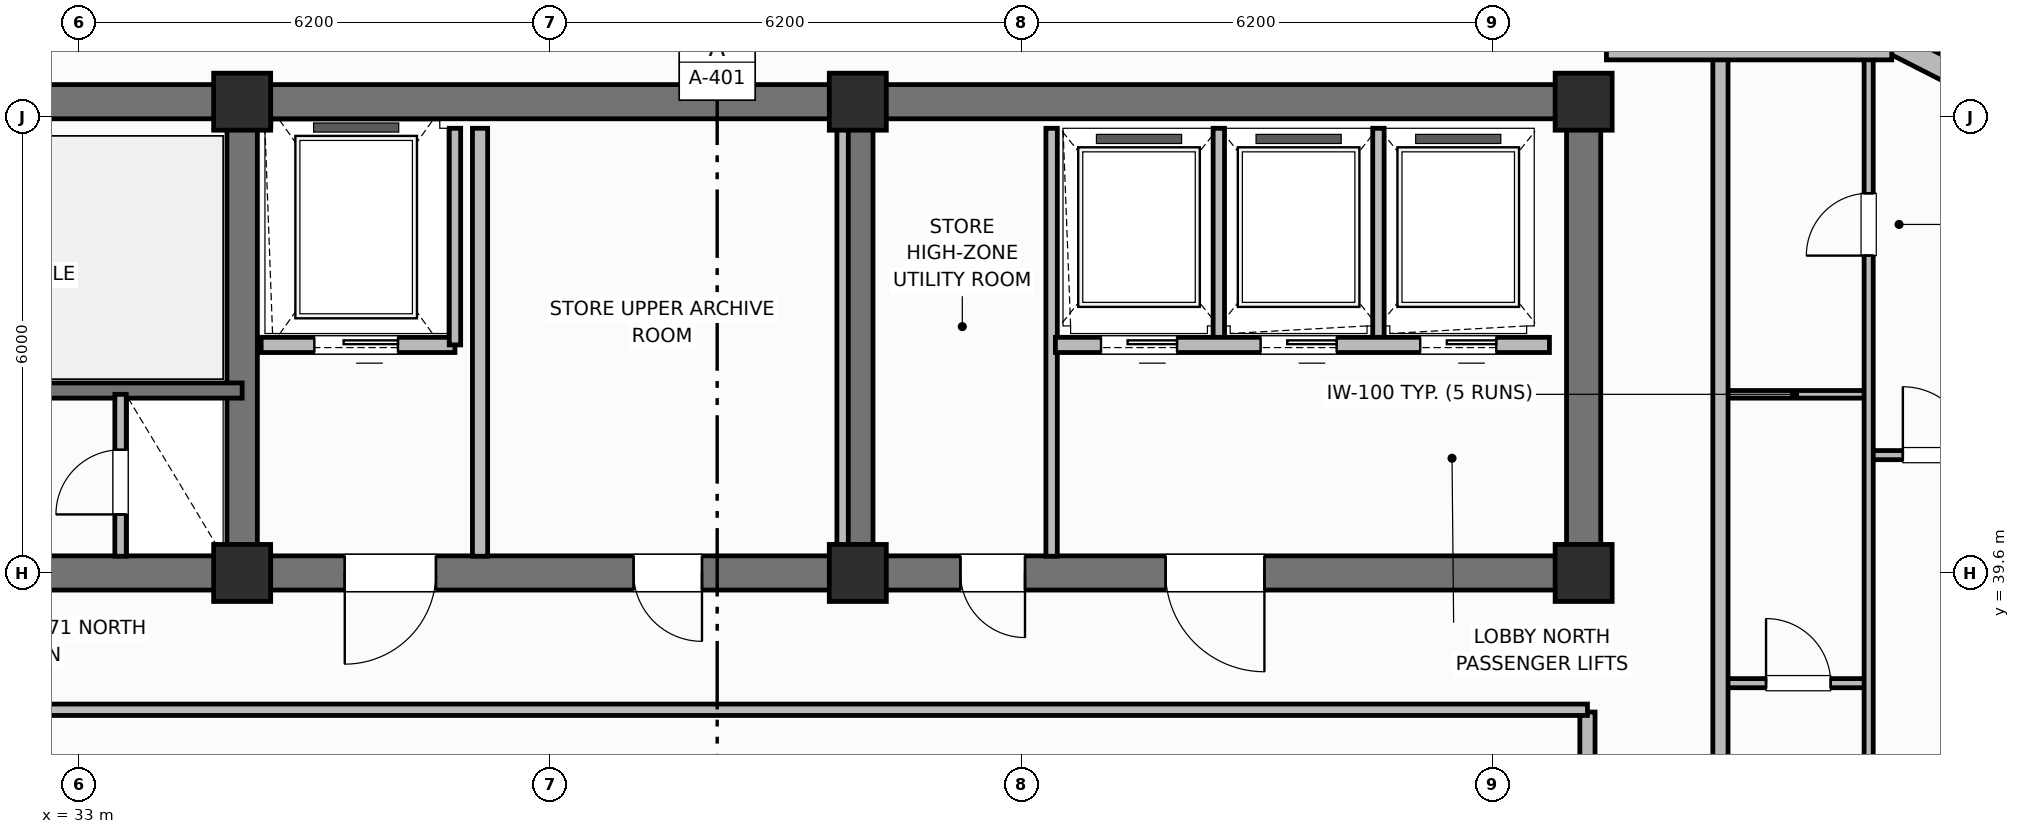
"""IFC4 building model, lengths in metres.
Left out: names, types, materials, properties, quantities, classifications, styles, units other than length and angle.
Written with IfcOpenShell. Run it as: python <this file> out.ifc"""

import sys

from ifc_helpers import new_model, si_unit, direction, frame, frame_2d, origin, origin_2d, place, context, subcontext, project, spatial, rectangle, extrude, element, fill, save


model = new_model("IFC4")
c1 = context("Model", 3, precision=1e-05, world=origin(), true_north=direction((0.0, 1.0)))
c2 = subcontext(c1, "Body", "Model", "MODEL_VIEW")
j1 = project(units=[si_unit("LENGTHUNIT", "METRE"), si_unit("PLANEANGLEUNIT", "RADIAN")], contexts=[c1])
p1 = place(None, origin())
s1 = spatial("IfcSite", under=j1, at=p1, CompositionType="ELEMENT")
p2 = place(p1, origin())
s2 = spatial("IfcBuilding", under=s1, at=p2, CompositionType="ELEMENT")
p3 = place(p2, frame((0.0, 0.0, 282.4)))
s3 = spatial("IfcBuildingStorey", under=s2, at=p3, CompositionType="ELEMENT", Elevation=282.4)
p4 = place(p3, frame((25.6, 45.8, 0.0), z_axis=(0.0, 0.0, 1.0), x_axis=(1.0, 0.0, 0.0)))
e1 = element("IfcWall", 1, at=p4, inside=s3, PredefinedType="SHEAR", context=c2, shape_type="SweptSolid", body=[
    extrude(rectangle(XDim=27.2, YDim=0.45, at=frame_2d((13.6, 0.0))), origin(), (0.0, 0.0, 1.0), 3.7),
])
p5 = place(p3, frame((52.8, 39.825, 0.0), z_axis=(0.0, 0.0, 1.0), x_axis=(0.0, 1.0, 0.0)))
e2 = element("IfcWall", 2, at=p5, inside=s3, PredefinedType="SHEAR", context=c2, shape_type="SweptSolid", body=[
    extrude(rectangle(XDim=5.75, YDim=0.45, at=frame_2d((2.875, 0.0))), origin(), (0.0, 0.0, 1.0), 3.7),
])
p6 = place(p3, frame((52.8, 39.6, 0.0), z_axis=(0.0, 0.0, 1.0), x_axis=(-1.0, 0.0, 0.0)))
e3 = element("IfcWall", 3, at=p6, inside=s3, PredefinedType="SHEAR", context=c2, shape_type="SweptSolid", body=[
    extrude(rectangle(XDim=27.2, YDim=0.45, at=frame_2d((13.6, 0.0))), origin(), (0.0, 0.0, 1.0), 3.7),
])
p7 = place(p6, frame((24.2, 0.0, 0.0)))
e4 = element("IfcOpeningElement", 4, at=p7, cuts=e3, PredefinedType="OPENING", context=c2, shape_type="SweptSolid", body=[
    extrude(rectangle(XDim=1.1, YDim=2.15, at=frame_2d((0.55, 1.075))), frame((0.0, 0.235, 0.0), z_axis=(0.0, -1.0, 0.0), x_axis=(1.0, 0.0, 0.0)), (0.0, 0.0, 1.0), 0.47),
])
p8 = place(p6, frame((15.1, 0.0, 0.0)))
e5 = element("IfcOpeningElement", 5, at=p8, cuts=e3, PredefinedType="OPENING", context=c2, shape_type="SweptSolid", body=[
    extrude(rectangle(XDim=1.2, YDim=2.15, at=frame_2d((0.6, 1.075))), frame((0.0, 0.235, 0.0), z_axis=(0.0, -1.0, 0.0), x_axis=(1.0, 0.0, 0.0)), (0.0, 0.0, 1.0), 0.47),
])
p9 = place(p6, frame((11.6, 0.0, 0.0)))
e6 = element("IfcOpeningElement", 6, at=p9, cuts=e3, PredefinedType="OPENING", context=c2, shape_type="SweptSolid", body=[
    extrude(rectangle(XDim=0.9, YDim=2.1, at=frame_2d((0.45, 1.05))), frame((0.0, 0.235, 0.0), z_axis=(0.0, -1.0, 0.0), x_axis=(1.0, 0.0, 0.0)), (0.0, 0.0, 1.0), 0.47),
])
p10 = place(p6, frame((7.35, 0.0, 0.0)))
e7 = element("IfcOpeningElement", 7, at=p10, cuts=e3, PredefinedType="OPENING", context=c2, shape_type="SweptSolid", body=[
    extrude(rectangle(XDim=0.85, YDim=2.1, at=frame_2d((0.425, 1.05))), frame((0.0, 0.235, 0.0), z_axis=(0.0, -1.0, 0.0), x_axis=(1.0, 0.0, 0.0)), (0.0, 0.0, 1.0), 0.47),
])
p11 = place(p6, frame((4.2, 0.0, 0.0)))
e8 = element("IfcOpeningElement", 8, at=p11, cuts=e3, PredefinedType="OPENING", context=c2, shape_type="SweptSolid", body=[
    extrude(rectangle(XDim=1.3, YDim=2.2, at=frame_2d((0.65, 1.1))), frame((0.0, 0.235, 0.0), z_axis=(0.0, -1.0, 0.0), x_axis=(1.0, 0.0, 0.0)), (0.0, 0.0, 1.0), 0.47),
])
for number, where, z_axis, x_axis in (
    (9, (35.15, 39.825, 0.0), (0.0, 0.0, 1.0), (0.0, 1.0, 0.0)),
    (10, (43.25, 39.825, 0.0), (0.0, 0.0, 1.0), (0.0, 1.0, 0.0)),
):
    element("IfcWall", number, at=place(p3, frame(where, z_axis=z_axis, x_axis=x_axis)), inside=s3, PredefinedType="SHEAR", context=c2, shape_type="SweptSolid", body=[
        extrude(rectangle(XDim=5.75, YDim=0.4, at=frame_2d((2.875, 0.0))), origin(), (0.0, 0.0, 1.0), 3.7),
    ])
for number, where, z_axis, x_axis in (
    (11, (35.15, 39.6, 0.0), (0.0, 0.0, 1.0), (1.0, 0.0, 0.0)),
    (12, (35.15, 45.8, 0.0), (0.0, 0.0, 1.0), (1.0, 0.0, 0.0)),
    (13, (43.25, 39.6, 0.0), (0.0, 0.0, 1.0), (1.0, 0.0, 0.0)),
    (14, (43.25, 45.8, 0.0), (0.0, 0.0, 1.0), (1.0, 0.0, 0.0)),
    (15, (52.8, 39.6, 0.0), (0.0, 0.0, 1.0), (1.0, 0.0, 0.0)),
    (16, (52.8, 45.8, 0.0), (0.0, 0.0, 1.0), (1.0, 0.0, 0.0)),
):
    element("IfcColumn", number, at=place(p3, frame(where, z_axis=z_axis, x_axis=x_axis)), inside=s3, PredefinedType="COLUMN", context=c2, shape_type="SweptSolid", body=[
        extrude(rectangle(XDim=0.75, YDim=0.75, at=origin_2d()), origin(), (0.0, 0.0, 1.0), 3.7),
    ])
p12 = place(p3, frame((57.633, 46.188, 0.0), z_axis=(0.0, 0.0, 1.0), x_axis=(-0.891076589373, 0.453852962833, 0.0)))
e17 = element("IfcWall", 17, at=p12, inside=s3, PredefinedType="SOLIDWALL", context=c2, shape_type="SweptSolid", body=[
    extrude(rectangle(XDim=0.954, YDim=0.3, at=frame_2d((0.477, 0.0))), origin(), (0.0, 0.0, 1.0), 2.73),
])
p13 = place(p3, frame((35.15, 42.0, 0.0), z_axis=(0.0, 0.0, 1.0), x_axis=(-1.0, 0.0, 0.0)))
e18 = element("IfcWall", 18, at=p13, inside=s3, PredefinedType="SHEAR", context=c2, shape_type="SweptSolid", body=[
    extrude(rectangle(XDim=9.55, YDim=0.2, at=frame_2d((4.775, 0.0))), origin(), (0.0, 0.0, 1.0), 3.7),
])
p14 = place(p13, frame((7.25, 0.0, 0.0)))
e19 = element("IfcOpeningElement", 19, at=p14, cuts=e18, PredefinedType="OPENING", context=c2, shape_type="SweptSolid", body=[
    extrude(rectangle(XDim=1.1, YDim=2.15, at=frame_2d((0.55, 1.075))), frame((0.0, 0.11, 0.0), z_axis=(0.0, -1.0, 0.0), x_axis=(1.0, 0.0, 0.0)), (0.0, 0.0, 1.0), 0.22),
])
p15 = place(p3, frame((33.55, 39.82, 0.0), z_axis=(0.0, 0.0, 1.0), x_axis=(0.0, 1.0, 0.0)))
e20 = element("IfcWall", 20, at=p15, inside=s3, PredefinedType="PARTITIONING", context=c2, shape_type="SweptSolid", body=[
    extrude(rectangle(XDim=2.13, YDim=0.15, at=frame_2d((1.065, 0.0))), origin(), (0.0, 0.0, 1.0), 2.56),
])
p16 = place(p15, frame((0.55, 0.0, 0.0)))
e21 = element("IfcOpeningElement", 21, at=p16, cuts=e20, PredefinedType="OPENING", context=c2, shape_type="SweptSolid", body=[
    extrude(rectangle(XDim=0.85, YDim=2.05, at=frame_2d((0.425, 1.025))), frame((0.0, 0.085, 0.0), z_axis=(0.0, -1.0, 0.0), x_axis=(1.0, 0.0, 0.0)), (0.0, 0.0, 1.0), 0.17),
])
p17 = place(p3, frame((37.95, 42.6, 0.0), z_axis=(0.0, 0.0, 1.0), x_axis=(-1.0, 0.0, 0.0)))
e22 = element("IfcWall", 22, at=p17, inside=s3, PredefinedType="PARTITIONING", context=c2, shape_type="SweptSolid", body=[
    extrude(rectangle(XDim=2.55, YDim=0.2, at=frame_2d((1.275, 0.0))), origin(), (0.0, 0.0, 1.0), 2.33),
])
p18 = place(p17, frame((0.75, 0.0, 0.0)))
e23 = element("IfcOpeningElement", 23, at=p18, cuts=e22, PredefinedType="OPENING", context=c2, shape_type="SweptSolid", body=[
    extrude(rectangle(XDim=1.1, YDim=2.15, at=frame_2d((0.55, 1.075))), frame((0.0, 0.11, 0.0), z_axis=(0.0, -1.0, 0.0), x_axis=(1.0, 0.0, 0.0)), (0.0, 0.0, 1.0), 0.22),
])
p19 = place(p3, frame((37.95, 42.6, 0.0), z_axis=(0.0, 0.0, 1.0), x_axis=(0.0, 1.0, 0.0)))
e24 = element("IfcWall", 24, at=p19, inside=s3, PredefinedType="PARTITIONING", context=c2, shape_type="SweptSolid", body=[
    extrude(rectangle(XDim=2.85, YDim=0.15, at=frame_2d((1.425, 0.0))), origin(), (0.0, 0.0, 1.0), 2.56),
])
p20 = place(p3, frame((38.28, 39.82, 0.0), z_axis=(0.0, 0.0, 1.0), x_axis=(0.0, 1.0, 0.0)))
e25 = element("IfcWall", 25, at=p20, inside=s3, PredefinedType="PARTITIONING", context=c2, shape_type="SweptSolid", body=[
    extrude(rectangle(XDim=5.63, YDim=0.2, at=frame_2d((2.815, 0.0))), origin(), (0.0, 0.0, 1.0), 2.56),
])
for number, where, z_axis, x_axis in (
    (26, (43.05, 39.82, 0.0), (0.0, 0.0, 1.0), (0.0, 1.0, 0.0)),
    (27, (45.8, 39.82, 0.0), (0.0, 0.0, 1.0), (0.0, 1.0, 0.0)),
):
    element("IfcWall", number, at=place(p3, frame(where, z_axis=z_axis, x_axis=x_axis)), inside=s3, PredefinedType="PARTITIONING", context=c2, shape_type="SweptSolid", body=[
        extrude(rectangle(XDim=5.63, YDim=0.15, at=frame_2d((2.815, 0.0))), origin(), (0.0, 0.0, 1.0), 2.56),
    ])
for number, where, z_axis, x_axis in (
    (28, (48.0, 42.65, 0.0), (0.0, 0.0, 1.0), (0.0, 1.0, 0.0)),
    (29, (50.1, 42.65, 0.0), (0.0, 0.0, 1.0), (0.0, 1.0, 0.0)),
):
    element("IfcWall", number, at=place(p3, frame(where, z_axis=z_axis, x_axis=x_axis)), inside=s3, PredefinedType="PARTITIONING", context=c2, shape_type="SweptSolid", body=[
        extrude(rectangle(XDim=2.8, YDim=0.15, at=frame_2d((1.4, 0.0))), origin(), (0.0, 0.0, 1.0), 2.56),
    ])
p21 = place(p3, frame((52.35, 42.6, 0.0), z_axis=(0.0, 0.0, 1.0), x_axis=(-1.0, 0.0, 0.0)))
e30 = element("IfcWall", 30, at=p21, inside=s3, PredefinedType="PARTITIONING", context=c2, shape_type="SweptSolid", body=[
    extrude(rectangle(XDim=6.5, YDim=0.2, at=frame_2d((3.25, 0.0))), origin(), (0.0, 0.0, 1.0), 2.56),
])
p22 = place(p21, frame((4.9, 0.0, 0.0)))
e31 = element("IfcOpeningElement", 31, at=p22, cuts=e30, PredefinedType="OPENING", context=c2, shape_type="SweptSolid", body=[
    extrude(rectangle(XDim=1.0, YDim=2.15, at=frame_2d((0.5, 1.075))), frame((0.0, 0.11, 0.0), z_axis=(0.0, -1.0, 0.0), x_axis=(1.0, 0.0, 0.0)), (0.0, 0.0, 1.0), 0.22),
])
p23 = place(p21, frame((2.8, 0.0, 0.0)))
e32 = element("IfcOpeningElement", 32, at=p23, cuts=e30, PredefinedType="OPENING", context=c2, shape_type="SweptSolid", body=[
    extrude(rectangle(XDim=1.0, YDim=2.15, at=frame_2d((0.5, 1.075))), frame((0.0, 0.11, 0.0), z_axis=(0.0, -1.0, 0.0), x_axis=(1.0, 0.0, 0.0)), (0.0, 0.0, 1.0), 0.22),
])
p24 = place(p21, frame((0.7, 0.0, 0.0)))
e33 = element("IfcOpeningElement", 33, at=p24, cuts=e30, PredefinedType="OPENING", context=c2, shape_type="SweptSolid", body=[
    extrude(rectangle(XDim=1.0, YDim=2.15, at=frame_2d((0.5, 1.075))), frame((0.0, 0.11, 0.0), z_axis=(0.0, -1.0, 0.0), x_axis=(1.0, 0.0, 0.0)), (0.0, 0.0, 1.0), 0.22),
])
p25 = place(p3, frame((52.85, 18.63, 0.0), z_axis=(0.0, 0.0, 1.0), x_axis=(0.0, 1.0, 0.0)))
e34 = element("IfcWall", 34, at=p25, inside=s3, PredefinedType="PARTITIONING", context=c2, shape_type="SweptSolid", body=[
    extrude(rectangle(XDim=19.14, YDim=0.2, at=frame_2d((9.57, 0.0))), origin(), (0.0, 0.0, 1.0), 2.56),
])
p26 = place(p3, frame((29.9, 37.8, 0.0), z_axis=(0.0, 0.0, 1.0), x_axis=(1.0, 0.0, 0.0)))
e35 = element("IfcWall", 35, at=p26, inside=s3, PredefinedType="PARTITIONING", context=c2, shape_type="SweptSolid", body=[
    extrude(rectangle(XDim=22.95, YDim=0.15, at=frame_2d((11.475, 0.0))), origin(), (0.0, 0.0, 1.0), 2.56),
])
p27 = place(p3, frame((54.6, 38.15, 0.0), z_axis=(0.0, 0.0, 1.0), x_axis=(1.0, 0.0, 0.0)))
e36 = element("IfcWall", 36, at=p27, inside=s3, PredefinedType="PARTITIONING", context=c2, shape_type="SweptSolid", body=[
    extrude(rectangle(XDim=1.95, YDim=0.12, at=frame_2d((0.975, 0.0))), origin(), (0.0, 0.0, 1.0), 2.56),
])
p28 = place(p27, frame((0.6, 0.0, 0.0)))
e37 = element("IfcOpeningElement", 37, at=p28, cuts=e36, PredefinedType="OPENING", context=c2, shape_type="SweptSolid", body=[
    extrude(rectangle(XDim=0.85, YDim=2.1, at=frame_2d((0.425, 1.05))), frame((0.0, 0.07, 0.0), z_axis=(0.0, -1.0, 0.0), x_axis=(1.0, 0.0, 0.0)), (0.0, 0.0, 1.0), 0.14),
])
p29 = place(p3, frame((54.6, 41.95, 0.0), z_axis=(0.0, 0.0, 1.0), x_axis=(1.0, 0.0, 0.0)))
e38 = element("IfcWall", 38, at=p29, inside=s3, PredefinedType="PARTITIONING", context=c2, shape_type="SweptSolid", body=[
    extrude(rectangle(XDim=1.95, YDim=0.1, at=frame_2d((0.975, 0.0))), origin(), (0.0, 0.0, 1.0), 2.56),
])
p30 = place(p3, frame((56.55, 41.15, 0.0), z_axis=(0.0, 0.0, 1.0), x_axis=(1.0, 0.0, 0.0)))
e39 = element("IfcWall", 39, at=p30, inside=s3, PredefinedType="PARTITIONING", context=c2, shape_type="SweptSolid", body=[
    extrude(rectangle(XDim=2.32, YDim=0.12, at=frame_2d((1.16, 0.0))), origin(), (0.0, 0.0, 1.0), 2.56),
])
p31 = place(p30, frame((0.45, 0.0, 0.0)))
e40 = element("IfcOpeningElement", 40, at=p31, cuts=e39, PredefinedType="OPENING", context=c2, shape_type="SweptSolid", body=[
    extrude(rectangle(XDim=0.9, YDim=2.1, at=frame_2d((0.45, 1.05))), frame((0.0, 0.07, 0.0), z_axis=(0.0, -1.0, 0.0), x_axis=(1.0, 0.0, 0.0)), (0.0, 0.0, 1.0), 0.14),
])
p32 = place(p3, frame((56.55, 32.79, 0.0), z_axis=(0.0, 0.0, 1.0), x_axis=(0.0, 1.0, 0.0)))
e41 = element("IfcWall", 41, at=p32, inside=s3, PredefinedType="PARTITIONING", context=c2, shape_type="SweptSolid", body=[
    extrude(rectangle(XDim=13.62, YDim=0.12, at=frame_2d((6.81, 0.0))), origin(), (0.0, 0.0, 1.0), 2.56),
])
p33 = place(p32, frame((0.61, 0.0, 0.0)))
e42 = element("IfcOpeningElement", 42, at=p33, cuts=e41, PredefinedType="OPENING", context=c2, shape_type="SweptSolid", body=[
    extrude(rectangle(XDim=0.9, YDim=2.1, at=frame_2d((0.45, 1.05))), frame((0.0, 0.07, 0.0), z_axis=(0.0, -1.0, 0.0), x_axis=(1.0, 0.0, 0.0)), (0.0, 0.0, 1.0), 0.14),
])
p34 = place(p32, frame((10.985, 0.0, 0.0)))
e43 = element("IfcOpeningElement", 43, at=p34, cuts=e41, PredefinedType="OPENING", context=c2, shape_type="SweptSolid", body=[
    extrude(rectangle(XDim=0.82, YDim=2.08, at=frame_2d((0.41, 1.04))), frame((0.0, 0.07, 0.0), z_axis=(0.0, -1.0, 0.0), x_axis=(1.0, 0.0, 0.0)), (0.0, 0.0, 1.0), 0.14),
])
p35 = place(p3, frame((54.6, 9.95, 0.0), z_axis=(0.0, 0.0, 1.0), x_axis=(0.0, 1.0, 0.0)))
e44 = element("IfcWall", 44, at=p35, inside=s3, PredefinedType="PARTITIONING", context=c2, shape_type="SweptSolid", body=[
    extrude(rectangle(XDim=36.5, YDim=0.2, at=frame_2d((18.25, 0.0))), origin(), (0.0, 0.0, 1.0), 2.56),
])
p36 = place(p35, frame((3.25, 0.0, 0.0)))
e45 = element("IfcOpeningElement", 45, at=p36, cuts=e44, PredefinedType="OPENING", context=c2, shape_type="SweptSolid", body=[
    extrude(rectangle(XDim=1.0, YDim=2.15, at=frame_2d((0.5, 1.075))), frame((0.0, 0.11, 0.0), z_axis=(0.0, -1.0, 0.0), x_axis=(1.0, 0.0, 0.0)), (0.0, 0.0, 1.0), 0.22),
])
p37 = place(p35, frame((23.5, 0.0, 0.0)))
e46 = element("IfcOpeningElement", 46, at=p37, cuts=e44, PredefinedType="OPENING", context=c2, shape_type="SweptSolid", body=[
    extrude(rectangle(XDim=1.0, YDim=2.15, at=frame_2d((0.5, 1.075))), frame((0.0, 0.11, 0.0), z_axis=(0.0, -1.0, 0.0), x_axis=(1.0, 0.0, 0.0)), (0.0, 0.0, 1.0), 0.22),
])
p38 = place(p3, frame((53.1, 46.45, 0.0), z_axis=(0.0, 0.0, 1.0), x_axis=(1.0, 0.0, 0.0)))
e47 = element("IfcWall", 47, at=p38, inside=s3, PredefinedType="PARTITIONING", context=c2, shape_type="SweptSolid", body=[
    extrude(rectangle(XDim=3.754, YDim=0.2, at=frame_2d((1.877, 0.0))), origin(), (0.0, 0.0, 1.0), 2.56),
])
p39 = place(p16, origin())
e48 = element("IfcDoor", 48, at=p39, inside=s3, OperationType="SINGLE_SWING_LEFT", PredefinedType="TRAPDOOR", context=c2, shape_type="SweptSolid", body=[
    extrude(rectangle(XDim=0.85, YDim=2.05, at=frame_2d((0.425, 1.025))), frame((0.0, 0.025, 0.0), z_axis=(0.0, -1.0, 0.0), x_axis=(1.0, 0.0, 0.0)), (0.0, 0.0, 1.0), 0.05),
])
fill(e21, e48)
p40 = place(p18, origin())
e49 = element("IfcDoor", 49, at=p40, inside=s3, OperationType="SLIDING_TO_LEFT", PredefinedType="DOOR", context=c2, shape_type="SweptSolid", body=[
    extrude(rectangle(XDim=1.1, YDim=2.15, at=frame_2d((0.55, 1.075))), frame((0.0, 0.025, 0.0), z_axis=(0.0, -1.0, 0.0), x_axis=(1.0, 0.0, 0.0)), (0.0, 0.0, 1.0), 0.05),
])
fill(e23, e49)
p41 = place(p22, origin())
e50 = element("IfcDoor", 50, at=p41, inside=s3, OperationType="SLIDING_TO_LEFT", PredefinedType="DOOR", context=c2, shape_type="SweptSolid", body=[
    extrude(rectangle(XDim=1.0, YDim=2.15, at=frame_2d((0.5, 1.075))), frame((0.0, 0.025, 0.0), z_axis=(0.0, -1.0, 0.0), x_axis=(1.0, 0.0, 0.0)), (0.0, 0.0, 1.0), 0.05),
])
fill(e31, e50)
p42 = place(p23, origin())
e51 = element("IfcDoor", 51, at=p42, inside=s3, OperationType="SLIDING_TO_LEFT", PredefinedType="DOOR", context=c2, shape_type="SweptSolid", body=[
    extrude(rectangle(XDim=1.0, YDim=2.15, at=frame_2d((0.5, 1.075))), frame((0.0, 0.025, 0.0), z_axis=(0.0, -1.0, 0.0), x_axis=(1.0, 0.0, 0.0)), (0.0, 0.0, 1.0), 0.05),
])
fill(e32, e51)
p43 = place(p24, origin())
e52 = element("IfcDoor", 52, at=p43, inside=s3, OperationType="SLIDING_TO_LEFT", PredefinedType="DOOR", context=c2, shape_type="SweptSolid", body=[
    extrude(rectangle(XDim=1.0, YDim=2.15, at=frame_2d((0.5, 1.075))), frame((0.0, 0.025, 0.0), z_axis=(0.0, -1.0, 0.0), x_axis=(1.0, 0.0, 0.0)), (0.0, 0.0, 1.0), 0.05),
])
fill(e33, e52)
p44 = place(p28, origin())
e53 = element("IfcDoor", 53, at=p44, inside=s3, OperationType="SINGLE_SWING_LEFT", PredefinedType="DOOR", context=c2, shape_type="SweptSolid", body=[
    extrude(rectangle(XDim=0.85, YDim=2.1, at=frame_2d((0.425, 1.05))), frame((0.0, 0.025, 0.0), z_axis=(0.0, -1.0, 0.0), x_axis=(1.0, 0.0, 0.0)), (0.0, 0.0, 1.0), 0.05),
])
fill(e37, e53)
p45 = place(p31, origin())
e54 = element("IfcDoor", 54, at=p45, inside=s3, OperationType="SINGLE_SWING_LEFT", PredefinedType="DOOR", context=c2, shape_type="SweptSolid", body=[
    extrude(rectangle(XDim=0.9, YDim=2.1, at=frame_2d((0.45, 1.05))), frame((0.0, 0.025, 0.0), z_axis=(0.0, -1.0, 0.0), x_axis=(1.0, 0.0, 0.0)), (0.0, 0.0, 1.0), 0.05),
])
fill(e40, e54)
p46 = place(p34, origin())
e55 = element("IfcDoor", 55, at=p46, inside=s3, OperationType="SINGLE_SWING_LEFT", PredefinedType="DOOR", context=c2, shape_type="SweptSolid", body=[
    extrude(rectangle(XDim=0.82, YDim=2.08, at=frame_2d((0.41, 1.04))), frame((0.0, 0.025, 0.0), z_axis=(0.0, -1.0, 0.0), x_axis=(1.0, 0.0, 0.0)), (0.0, 0.0, 1.0), 0.05),
])
fill(e43, e55)
p47 = place(p8, origin())
e56 = element("IfcDoor", 56, at=p47, inside=s3, OperationType="SINGLE_SWING_RIGHT", PredefinedType="DOOR", context=c2, shape_type="SweptSolid", body=[
    extrude(rectangle(XDim=1.2, YDim=2.15, at=frame_2d((0.6, 1.075))), frame((0.0, 0.025, 0.0), z_axis=(0.0, -1.0, 0.0), x_axis=(1.0, 0.0, 0.0)), (0.0, 0.0, 1.0), 0.05),
])
fill(e5, e56)
p48 = place(p9, origin())
e57 = element("IfcDoor", 57, at=p48, inside=s3, OperationType="SINGLE_SWING_LEFT", PredefinedType="DOOR", context=c2, shape_type="SweptSolid", body=[
    extrude(rectangle(XDim=0.9, YDim=2.1, at=frame_2d((0.45, 1.05))), frame((0.0, 0.025, 0.0), z_axis=(0.0, -1.0, 0.0), x_axis=(1.0, 0.0, 0.0)), (0.0, 0.0, 1.0), 0.05),
])
fill(e6, e57)
p49 = place(p10, origin())
e58 = element("IfcDoor", 58, at=p49, inside=s3, OperationType="SINGLE_SWING_LEFT", PredefinedType="DOOR", context=c2, shape_type="SweptSolid", body=[
    extrude(rectangle(XDim=0.85, YDim=2.1, at=frame_2d((0.425, 1.05))), frame((0.0, 0.025, 0.0), z_axis=(0.0, -1.0, 0.0), x_axis=(1.0, 0.0, 0.0)), (0.0, 0.0, 1.0), 0.05),
])
fill(e7, e58)
p50 = place(p11, origin())
e59 = element("IfcDoor", 59, at=p50, inside=s3, OperationType="SINGLE_SWING_LEFT", PredefinedType="DOOR", context=c2, shape_type="SweptSolid", body=[
    extrude(rectangle(XDim=1.3, YDim=2.2, at=frame_2d((0.65, 1.1))), frame((0.0, 0.025, 0.0), z_axis=(0.0, -1.0, 0.0), x_axis=(1.0, 0.0, 0.0)), (0.0, 0.0, 1.0), 0.05),
])
fill(e8, e59)
save(model, sys.argv[1])
